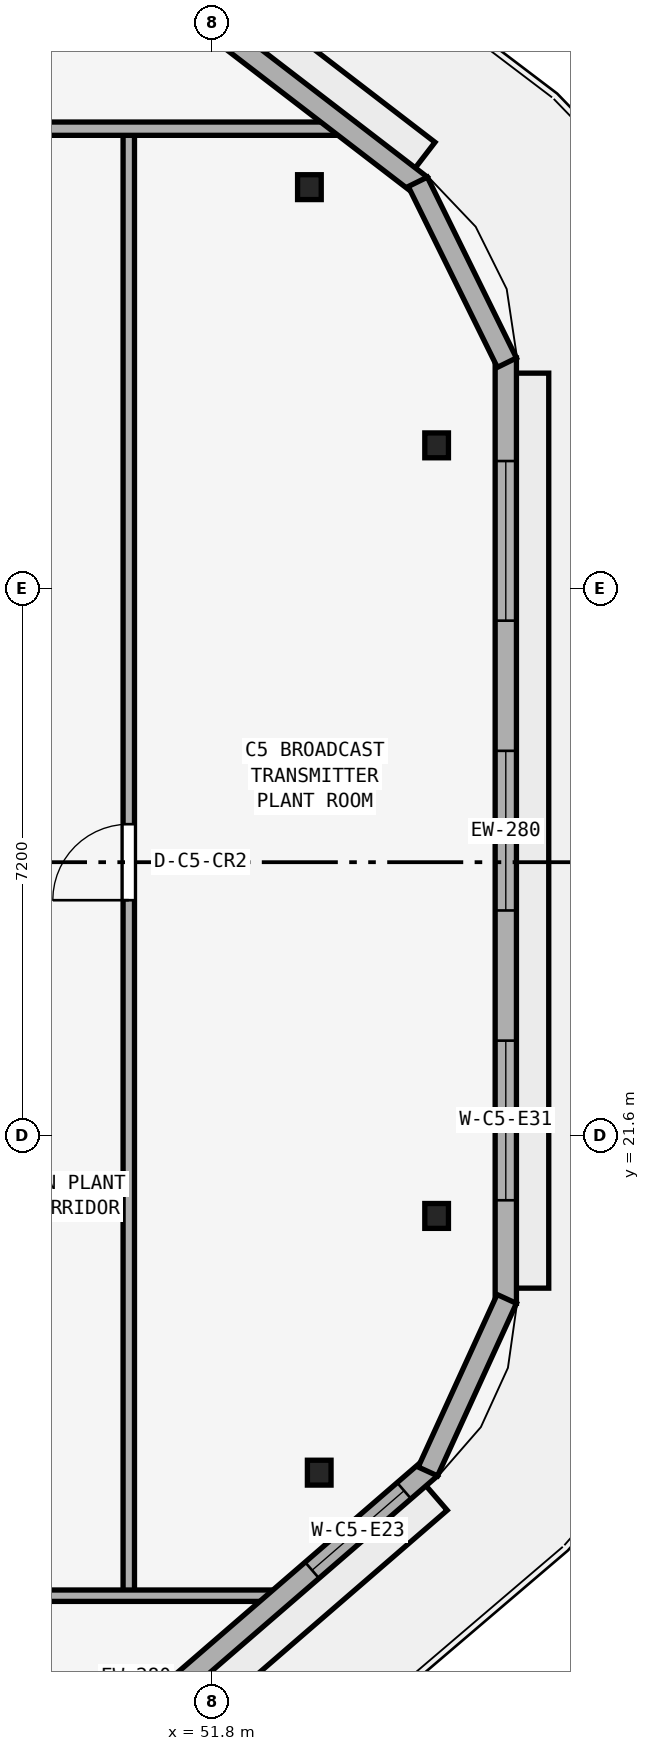
"""IFC4 building model, lengths in metres.
Left out: names, types, materials, properties, quantities, classifications, styles, units other than length and angle.
Written with IfcOpenShell. Run it as: python <this file> out.ifc"""

import sys

from ifc_helpers import new_model, si_unit, direction, frame, frame_2d, origin, origin_2d, place, context, subcontext, project, spatial, rectangle, i_section, extrude, element, fill, save


model = new_model("IFC4")
c1 = context("Model", 3, precision=1e-05, world=origin(), true_north=direction((0.0, 1.0)))
c2 = subcontext(c1, "Body", "Model", "MODEL_VIEW")
j1 = project(units=[si_unit("LENGTHUNIT", "METRE"), si_unit("PLANEANGLEUNIT", "RADIAN")], contexts=[c1])
p1 = place(None, origin())
s1 = spatial("IfcSite", under=j1, at=p1, CompositionType="ELEMENT")
p2 = place(p1, origin())
s2 = spatial("IfcBuilding", under=s1, at=p2, CompositionType="ELEMENT")
p3 = place(p2, frame((0.0, 0.0, 329.4)))
s3 = spatial("IfcBuildingStorey", under=s2, at=p3, CompositionType="ELEMENT", Elevation=329.4)
for number, where, z_axis, x_axis in (
    (1, (53.205, 17.169, 0.0), (0.0, 0.0, 1.0), (1.0, 0.0, 0.0)),
    (2, (54.75, 20.546, 0.0), (0.0, 0.0, 1.0), (1.0, 0.0, 0.0)),
    (3, (54.75, 30.684, 0.0), (0.0, 0.0, 1.0), (1.0, 0.0, 0.0)),
    (4, (53.076, 34.081, 0.0), (0.0, 0.0, 1.0), (1.0, 0.0, 0.0)),
):
    element("IfcColumn", number, at=place(p3, frame(where, z_axis=z_axis, x_axis=x_axis)), inside=s3, PredefinedType="COLUMN", context=c2, shape_type="SweptSolid", body=[
        extrude(i_section(OverallWidth=0.311, OverallDepth=0.327, WebThickness=0.016, FlangeThickness=0.025, at=origin_2d()), origin(), (0.0, 0.0, 1.0), 4.0),
    ])
p4 = place(p3, frame((50.7, 15.55, 0.0), z_axis=(0.0, 0.0, 1.0), x_axis=(0.0, 1.0, 0.0)))
e5 = element("IfcWall", 5, at=p4, inside=s3, PredefinedType="PARTITIONING", context=c2, shape_type="SweptSolid", body=[
    extrude(rectangle(XDim=19.3, YDim=0.15, at=frame_2d((9.65, 0.0))), origin(), (0.0, 0.0, 1.0), 3.72),
])
p5 = place(p4, frame((9.15, 0.0, 0.0)))
e6 = element("IfcOpeningElement", 6, at=p5, cuts=e5, PredefinedType="OPENING", context=c2, shape_type="SweptSolid", body=[
    extrude(rectangle(XDim=1.0, YDim=2.12, at=frame_2d((0.5, 1.06))), frame((0.0, 0.085, 0.0), z_axis=(0.0, -1.0, 0.0), x_axis=(1.0, 0.0, 0.0)), (0.0, 0.0, 1.0), 0.17),
])
p6 = place(p3, frame((28.818, 15.55, 0.0), z_axis=(0.0, 0.0, 1.0), x_axis=(1.0, 0.0, 0.0)))
e7 = element("IfcWall", 7, at=p6, inside=s3, PredefinedType="PARTITIONING", context=c2, shape_type="SweptSolid", body=[
    extrude(rectangle(XDim=23.98, YDim=0.15, at=frame_2d((11.99, 0.0))), origin(), (0.0, 0.0, 1.0), 3.72),
])
p7 = place(p6, frame((10.583, 0.0, 0.0)))
e8 = element("IfcOpeningElement", 8, at=p7, cuts=e7, PredefinedType="OPENING", context=c2, shape_type="SweptSolid", body=[
    extrude(rectangle(XDim=1.0, YDim=2.12, at=frame_2d((0.5, 1.06))), frame((0.0, 0.085, 0.0), z_axis=(0.0, -1.0, 0.0), x_axis=(1.0, 0.0, 0.0)), (0.0, 0.0, 1.0), 0.17),
])
p8 = place(p3, frame((29.236, 34.85, 0.0), z_axis=(0.0, 0.0, 1.0), x_axis=(1.0, 0.0, 0.0)))
e9 = element("IfcWall", 9, at=p8, inside=s3, PredefinedType="PARTITIONING", context=c2, shape_type="SweptSolid", body=[
    extrude(rectangle(XDim=24.422, YDim=0.175, at=frame_2d((12.211, 0.0))), origin(), (0.0, 0.0, 1.0), 3.72),
])
p9 = place(p8, frame((10.365, 0.0, 0.0)))
e10 = element("IfcOpeningElement", 10, at=p9, cuts=e9, PredefinedType="OPENING", context=c2, shape_type="SweptSolid", body=[
    extrude(rectangle(XDim=1.0, YDim=2.12, at=frame_2d((0.5, 1.06))), frame((0.0, 0.097, 0.0), z_axis=(0.0, -1.0, 0.0), x_axis=(1.0, 0.0, 0.0)), (0.0, 0.0, 1.0), 0.195),
])
p10 = place(p3, frame((46.921, 10.533, 0.0), z_axis=(0.0, 0.0, 1.0), x_axis=(0.756489047049, 0.654006362121, 0.0)))
e11 = element("IfcWall", 11, at=p10, inside=s3, PredefinedType="STANDARD", context=c2, shape_type="SweptSolid", body=[
    extrude(rectangle(XDim=10.244, YDim=0.28, at=frame_2d((5.122, 0.0))), origin(), (0.0, 0.0, 1.0), 3.72),
])
p11 = place(p10, frame((1.24, 0.0, 0.9)))
e12 = element("IfcOpeningElement", 12, at=p11, cuts=e11, PredefinedType="OPENING", context=c2, shape_type="SweptSolid", body=[
    extrude(rectangle(XDim=1.6, YDim=1.45, at=frame_2d((0.8, 0.725))), frame((0.0, 0.15, 0.0), z_axis=(0.0, -1.0, 0.0), x_axis=(1.0, 0.0, 0.0)), (0.0, 0.0, 1.0), 0.3),
])
p12 = place(p10, frame((4.322, 0.0, 0.9)))
e13 = element("IfcOpeningElement", 13, at=p12, cuts=e11, PredefinedType="OPENING", context=c2, shape_type="SweptSolid", body=[
    extrude(rectangle(XDim=1.6, YDim=1.45, at=frame_2d((0.8, 0.725))), frame((0.0, 0.15, 0.0), z_axis=(0.0, -1.0, 0.0), x_axis=(1.0, 0.0, 0.0)), (0.0, 0.0, 1.0), 0.3),
])
p13 = place(p10, frame((8.183, 0.0, 0.9)))
e14 = element("IfcOpeningElement", 14, at=p13, cuts=e11, PredefinedType="OPENING", context=c2, shape_type="SweptSolid", body=[
    extrude(rectangle(XDim=1.6, YDim=1.45, at=frame_2d((0.8, 0.725))), frame((0.0, 0.15, 0.0), z_axis=(0.0, -1.0, 0.0), x_axis=(1.0, 0.0, 0.0)), (0.0, 0.0, 1.0), 0.3),
])
p14 = place(p3, frame((55.66, 19.396, 0.0), z_axis=(0.0, 0.0, 1.0), x_axis=(0.0, 1.0, 0.0)))
e15 = element("IfcWall", 15, at=p14, inside=s3, PredefinedType="STANDARD", context=c2, shape_type="SweptSolid", body=[
    extrude(rectangle(XDim=12.438, YDim=0.28, at=frame_2d((6.219, 0.0))), origin(), (0.0, 0.0, 1.0), 3.72),
])
p15 = place(p14, frame((1.356, 0.0, 0.9)))
e16 = element("IfcOpeningElement", 16, at=p15, cuts=e15, PredefinedType="OPENING", context=c2, shape_type="SweptSolid", body=[
    extrude(rectangle(XDim=2.1, YDim=1.7, at=frame_2d((1.05, 0.85))), frame((0.0, 0.15, 0.0), z_axis=(0.0, -1.0, 0.0), x_axis=(1.0, 0.0, 0.0)), (0.0, 0.0, 1.0), 0.3),
])
p16 = place(p14, frame((5.169, 0.0, 0.9)))
e17 = element("IfcOpeningElement", 17, at=p16, cuts=e15, PredefinedType="OPENING", context=c2, shape_type="SweptSolid", body=[
    extrude(rectangle(XDim=2.1, YDim=1.7, at=frame_2d((1.05, 0.85))), frame((0.0, 0.15, 0.0), z_axis=(0.0, -1.0, 0.0), x_axis=(1.0, 0.0, 0.0)), (0.0, 0.0, 1.0), 0.3),
])
p17 = place(p14, frame((8.981, 0.0, 0.9)))
e18 = element("IfcOpeningElement", 18, at=p17, cuts=e15, PredefinedType="OPENING", context=c2, shape_type="SweptSolid", body=[
    extrude(rectangle(XDim=2.1, YDim=1.7, at=frame_2d((1.05, 0.85))), frame((0.0, 0.15, 0.0), z_axis=(0.0, -1.0, 0.0), x_axis=(1.0, 0.0, 0.0)), (0.0, 0.0, 1.0), 0.3),
])
p18 = place(p3, frame((54.543, 34.102, 0.0), z_axis=(0.0, 0.0, 1.0), x_axis=(-0.792926835332, 0.609316858302, 0.0)))
e19 = element("IfcWall", 19, at=p18, inside=s3, PredefinedType="STANDARD", context=c2, shape_type="SweptSolid", body=[
    extrude(rectangle(XDim=9.647, YDim=0.28, at=frame_2d((4.823, 0.0))), origin(), (0.0, 0.0, 1.0), 3.72),
])
p19 = place(p18, frame((4.023, 0.0, 0.9)))
e20 = element("IfcOpeningElement", 20, at=p19, cuts=e19, PredefinedType="OPENING", context=c2, shape_type="SweptSolid", body=[
    extrude(rectangle(XDim=1.6, YDim=1.45, at=frame_2d((0.8, 0.725))), frame((0.0, 0.15, 0.0), z_axis=(0.0, -1.0, 0.0), x_axis=(1.0, 0.0, 0.0)), (0.0, 0.0, 1.0), 0.3),
])
p20 = place(p18, frame((6.906, 0.0, 0.9)))
e21 = element("IfcOpeningElement", 21, at=p20, cuts=e19, PredefinedType="OPENING", context=c2, shape_type="SweptSolid", body=[
    extrude(rectangle(XDim=1.6, YDim=1.45, at=frame_2d((0.8, 0.725))), frame((0.0, 0.15, 0.0), z_axis=(0.0, -1.0, 0.0), x_axis=(1.0, 0.0, 0.0)), (0.0, 0.0, 1.0), 0.3),
])
p21 = place(p3, frame((54.635, 17.185, 0.0), z_axis=(0.0, 0.0, 1.0), x_axis=(0.415873043692, 0.909422680348, 0.0)))
e22 = element("IfcWall", 22, at=p21, inside=s3, PredefinedType="STANDARD", context=c2, shape_type="SweptSolid", body=[
    extrude(rectangle(XDim=2.496, YDim=0.28, at=frame_2d((1.248, 0.0))), origin(), (0.0, 0.0, 1.0), 3.72),
])
p22 = place(p3, frame((55.674, 31.772, 0.0), z_axis=(0.0, 0.0, 1.0), x_axis=(-0.441902900826, 0.897062888677, 0.0)))
e23 = element("IfcWall", 23, at=p22, inside=s3, PredefinedType="STANDARD", context=c2, shape_type="SweptSolid", body=[
    extrude(rectangle(XDim=2.652, YDim=0.28, at=frame_2d((1.326, 0.0))), origin(), (0.0, 0.0, 1.0), 3.72),
])
p23 = place(p5, origin())
e24 = element("IfcDoor", 24, at=p23, inside=s3, OperationType="SINGLE_SWING_LEFT", PredefinedType="DOOR", context=c2, shape_type="SweptSolid", body=[
    extrude(rectangle(XDim=1.0, YDim=2.12, at=frame_2d((0.5, 1.06))), frame((0.0, 0.025, 0.0), z_axis=(0.0, -1.0, 0.0), x_axis=(1.0, 0.0, 0.0)), (0.0, 0.0, 1.0), 0.05),
])
fill(e6, e24)
p24 = place(p13, origin())
e25 = element("IfcWindow", 25, at=p24, inside=s3, PartitioningType="SINGLE_PANEL", PredefinedType="WINDOW", context=c2, shape_type="SweptSolid", body=[
    extrude(rectangle(XDim=1.6, YDim=1.45, at=frame_2d((0.8, 0.725))), frame((0.0, 0.03, 0.0), z_axis=(0.0, -1.0, 0.0), x_axis=(1.0, 0.0, 0.0)), (0.0, 0.0, 1.0), 0.06),
])
fill(e14, e25)
p25 = place(p15, origin())
e26 = element("IfcWindow", 26, at=p25, inside=s3, PartitioningType="SINGLE_PANEL", PredefinedType="WINDOW", context=c2, shape_type="SweptSolid", body=[
    extrude(rectangle(XDim=2.1, YDim=1.7, at=frame_2d((1.05, 0.85))), frame((0.0, 0.03, 0.0), z_axis=(0.0, -1.0, 0.0), x_axis=(1.0, 0.0, 0.0)), (0.0, 0.0, 1.0), 0.06),
])
fill(e16, e26)
p26 = place(p16, origin())
e27 = element("IfcWindow", 27, at=p26, inside=s3, PartitioningType="SINGLE_PANEL", PredefinedType="WINDOW", context=c2, shape_type="SweptSolid", body=[
    extrude(rectangle(XDim=2.1, YDim=1.7, at=frame_2d((1.05, 0.85))), frame((0.0, 0.03, 0.0), z_axis=(0.0, -1.0, 0.0), x_axis=(1.0, 0.0, 0.0)), (0.0, 0.0, 1.0), 0.06),
])
fill(e17, e27)
p27 = place(p17, origin())
e28 = element("IfcWindow", 28, at=p27, inside=s3, PartitioningType="SINGLE_PANEL", PredefinedType="WINDOW", context=c2, shape_type="SweptSolid", body=[
    extrude(rectangle(XDim=2.1, YDim=1.7, at=frame_2d((1.05, 0.85))), frame((0.0, 0.03, 0.0), z_axis=(0.0, -1.0, 0.0), x_axis=(1.0, 0.0, 0.0)), (0.0, 0.0, 1.0), 0.06),
])
fill(e18, e28)
save(model, sys.argv[1])
